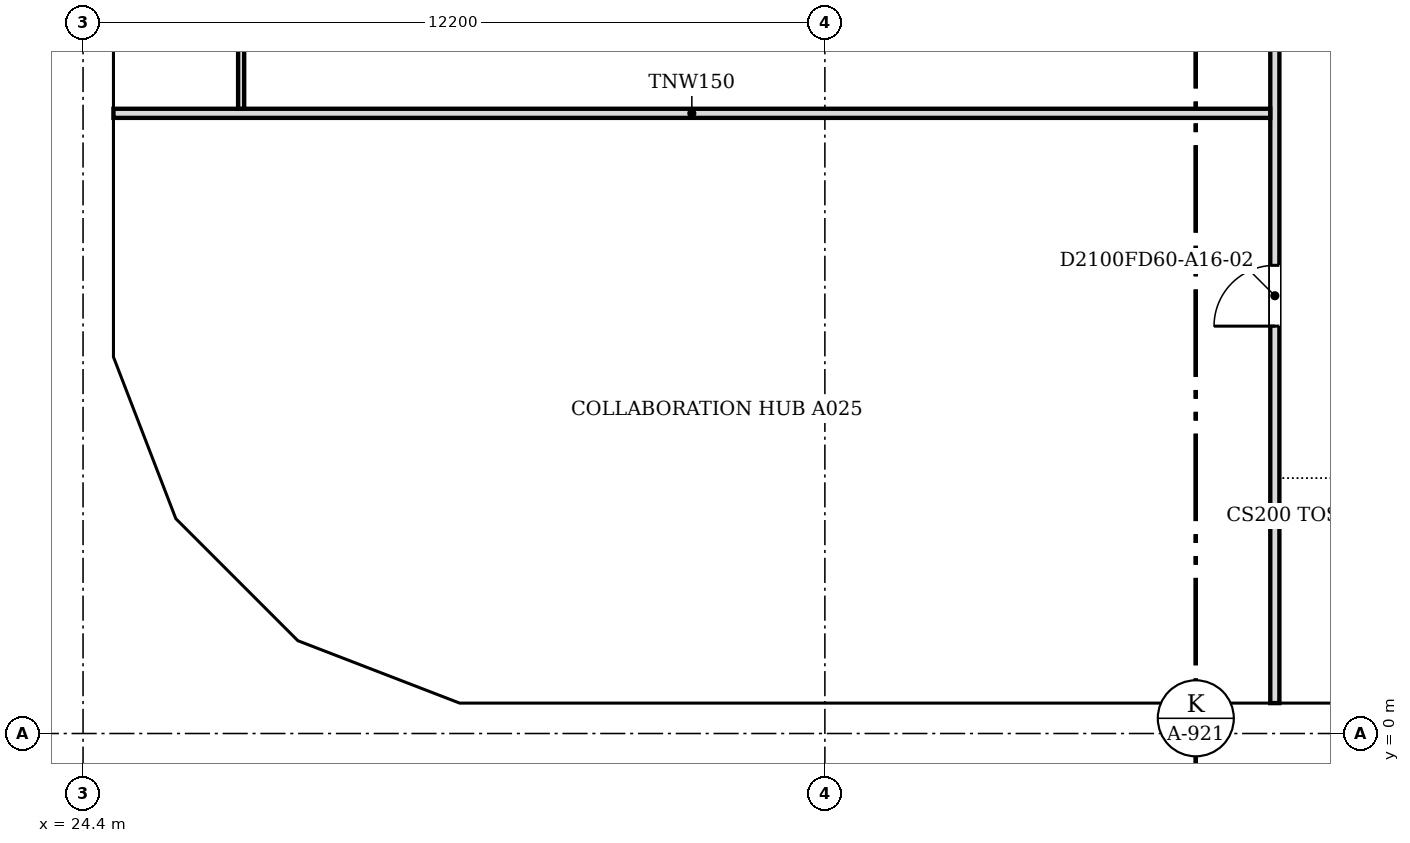
"""IFC4 building model, lengths in metres.
Left out: names, types, materials, properties, quantities, classifications, styles, units other than length and angle.
Written with IfcOpenShell. Run it as: python <this file> out.ifc"""

import sys

from ifc_helpers import new_model, si_unit, direction, frame, frame_2d, origin, place, context, subcontext, project, spatial, polyline, rectangle, outline, extrude, faceted_brep, source, transform, mapped, element, fill, save


model = new_model("IFC4")
c1 = context("Model", 3, precision=1e-05, world=origin(), true_north=direction((0.0, 1.0)))
c2 = subcontext(c1, "Body", "Model", "MODEL_VIEW")
j1 = project(units=[si_unit("LENGTHUNIT", "METRE"), si_unit("PLANEANGLEUNIT", "RADIAN")], contexts=[c1])
p1 = place(None, origin())
s1 = spatial("IfcSite", under=j1, at=p1, CompositionType="ELEMENT")
p2 = place(p1, origin())
s2 = spatial("IfcBuilding", under=s1, at=p2, CompositionType="ELEMENT")
p3 = place(p2, frame((0.0, 0.0, 178.2)))
s3 = spatial("IfcBuildingStorey", under=s2, at=p3, CompositionType="ELEMENT", Elevation=178.2)
m1 = source(origin(), c2, "Body", "Brep", [
    faceted_brep([(0.047, -0.25, 0.0), (3.05, -0.25, 3.8), (0.047, -0.25, 7.6), (0.0, -0.25, 7.54), (0.0, -0.25, 0.06), (0.093, 0.25, 7.541), (3.05, 0.25, 3.8), (0.093, 0.25, 0.059), (0.047, 0.0, 0.0), (0.047, 0.0, 7.6)], [[[0, 1, 2, 3, 4]], [[5, 6, 7]], [[7, 6, 1, 0, 8]], [[6, 5, 9, 2, 1]], [[3, 2, 9]], [[8, 0, 4]], [[7, 8, 4, 3, 9, 5]]]),
])
p4 = place(p3, frame((30.5, 0.25, -3.8), z_axis=(0.0, 0.0, 1.0), x_axis=(1.0, 0.0, 0.0)))
e1 = element("IfcWall", 1, at=p4, inside=s3, PredefinedType="SOLIDWALL", context=c2, shape_type="MappedRepresentation", body=[
    mapped(m1, transform((0.0, 0.0, 0.0), scale=1.0)),
])
m2 = source(origin(), c2, "Body", "SweptSolid", [
    extrude(outline(polyline([(0.247, 0.656), (2.731, 3.8), (0.247, 6.944), (0.247, 0.656)])), frame((0.0, 0.26, 0.0), z_axis=(0.0, -1.0, 0.0), x_axis=(1.0, 0.0, 0.0)), (0.0, 0.0, 1.0), 0.52),
])
p5 = place(p4, origin())
e2 = element("IfcOpeningElement", 2, at=p5, cuts=e1, PredefinedType="OPENING", context=c2, shape_type="MappedRepresentation", body=[
    mapped(m2, transform((0.0, 0.0, 0.0), scale=1.0)),
])
m3 = source(origin(), c2, "Body", "Brep", [
    faceted_brep([(2.95, -0.25, 0.0), (2.997, -0.25, 0.059), (2.997, -0.25, 7.541), (2.95, -0.25, 7.6), (0.0, -0.25, 3.8), (0.053, 0.25, 3.868), (2.904, 0.25, 7.54), (2.904, 0.25, 0.06), (0.053, 0.25, 3.732), (2.95, 0.0, 0.0), (2.95, 0.0, 7.6), (0.0, 0.0, 3.8)], [[[0, 1, 2, 3, 4]], [[5, 6, 7, 8]], [[1, 0, 9]], [[10, 3, 2]], [[6, 5, 11, 4, 3, 10]], [[8, 7, 9, 0, 4, 11]], [[8, 11, 5]], [[1, 9, 7, 6, 10, 2]]]),
])
p6 = place(p3, frame((27.794, 1.312, -3.8), z_axis=(0.0, 0.0, 1.0), x_axis=(0.932973525033, -0.359944998003, 0.0)))
e3 = element("IfcWall", 3, at=p6, inside=s3, PredefinedType="SOLIDWALL", context=c2, shape_type="MappedRepresentation", body=[
    mapped(m3, transform((0.0, 0.0, 0.0), scale=1.0)),
])
m4 = source(origin(), c2, "Body", "SweptSolid", [
    extrude(outline(polyline([(2.75, 6.935), (0.316, 3.8), (2.75, 0.665), (2.75, 6.935)])), frame((0.0, 0.26, 0.0), z_axis=(0.0, -1.0, 0.0), x_axis=(1.0, 0.0, 0.0)), (0.0, 0.0, 1.0), 0.52),
])
p7 = place(p6, origin())
e4 = element("IfcOpeningElement", 4, at=p7, cuts=e3, PredefinedType="OPENING", context=c2, shape_type="MappedRepresentation", body=[
    mapped(m4, transform((0.0, 0.0, 0.0), scale=1.0)),
])
m5 = source(origin(), c2, "Body", "Brep", [
    faceted_brep([(3.05, -0.25, 0.0), (6.1, -0.25, 3.8), (6.1, -0.25, 3.8), (3.05, -0.25, 7.6), (0.0, -0.25, 3.8), (0.0, 0.25, 3.8), (3.05, 0.25, 7.6), (6.1, 0.25, 3.8), (6.1, 0.25, 3.8), (3.05, 0.25, 0.0)], [[[0, 1, 2, 3, 4]], [[5, 6, 7, 8, 9]], [[9, 8, 1, 0]], [[7, 6, 3, 2]], [[6, 5, 4, 3]], [[5, 9, 0, 4]], [[1, 8, 7, 2]]]),
])
p8 = place(p3, frame((33.55, 0.25, -3.8), z_axis=(0.0, 0.0, 1.0), x_axis=(1.0, 0.0, 0.0)))
e5 = element("IfcWall", 5, at=p8, inside=s3, PredefinedType="SOLIDWALL", context=c2, shape_type="MappedRepresentation", body=[
    mapped(m5, transform((0.0, 0.0, 0.0), scale=1.0)),
])
m6 = source(origin(), c2, "Body", "SweptSolid", [
    extrude(outline(polyline([(3.05, 0.399), (5.78, 3.8), (3.05, 7.201), (0.321, 3.8), (3.05, 0.399)])), frame((0.0, 0.26, 0.0), z_axis=(0.0, -1.0, 0.0), x_axis=(1.0, 0.0, 0.0)), (0.0, 0.0, 1.0), 0.52),
])
p9 = place(p8, origin())
e6 = element("IfcOpeningElement", 6, at=p9, cuts=e5, PredefinedType="OPENING", context=c2, shape_type="MappedRepresentation", body=[
    mapped(m6, transform((0.0, 0.0, 0.0), scale=1.0)),
])
m7 = source(origin(), c2, "Body", "SweptSolid", [
    extrude(outline(polyline([(3.05, 0.0), (6.1, 3.8), (3.05, 7.6), (0.0, 3.8), (3.05, 0.0)])), frame((0.0, 0.25, 0.0), z_axis=(0.0, -1.0, 0.0), x_axis=(1.0, 0.0, 0.0)), (0.0, 0.0, 1.0), 0.5),
])
p10 = place(p3, frame((39.65, 0.25, -3.8), z_axis=(0.0, 0.0, 1.0), x_axis=(1.0, 0.0, 0.0)))
e7 = element("IfcWall", 7, at=p10, inside=s3, PredefinedType="SOLIDWALL", context=c2, shape_type="MappedRepresentation", body=[
    mapped(m7, transform((0.0, 0.0, 0.0), scale=1.0)),
])
p11 = place(p10, origin())
e8 = element("IfcOpeningElement", 8, at=p11, cuts=e7, PredefinedType="OPENING", context=c2, shape_type="MappedRepresentation", body=[
    mapped(m6, transform((0.0, 0.0, 0.0), scale=1.0)),
])
m8 = source(origin(), c2, "Body", "Brep", [
    faceted_brep([(3.096, -0.25, 0.0), (6.1, -0.25, 3.8), (3.096, -0.25, 7.6), (0.047, -0.25, 3.857), (0.047, -0.25, 3.743), (0.0, 0.25, 3.8), (3.096, 0.25, 7.6), (6.053, 0.25, 3.859), (6.053, 0.25, 3.741), (3.096, 0.25, 0.0), (6.1, -0.0, 3.8), (0.0, 0.0, 3.8)], [[[0, 1, 2, 3, 4]], [[5, 6, 7, 8, 9]], [[9, 8, 10, 1, 0]], [[7, 6, 2, 1, 10]], [[6, 5, 11, 3, 2]], [[5, 9, 0, 4, 11]], [[11, 4, 3]], [[10, 8, 7]]]),
])
p12 = place(p3, frame((24.65, 12.247, -3.8), z_axis=(0.0, 0.0, 1.0), x_axis=(0.0, -1.0, 0.0)))
e9 = element("IfcWall", 9, at=p12, inside=s3, PredefinedType="SOLIDWALL", context=c2, shape_type="MappedRepresentation", body=[
    mapped(m8, transform((0.0, 0.0, 0.0), scale=1.0)),
])
m9 = source(origin(), c2, "Body", "SweptSolid", [
    extrude(outline(polyline([(3.094, 0.399), (5.781, 3.8), (3.094, 7.201), (0.323, 3.8), (3.094, 0.399)])), frame((0.0, 0.26, 0.0), z_axis=(0.0, -1.0, 0.0), x_axis=(1.0, 0.0, 0.0)), (0.0, 0.0, 1.0), 0.52),
])
p13 = place(p12, origin())
e10 = element("IfcOpeningElement", 10, at=p13, cuts=e9, PredefinedType="OPENING", context=c2, shape_type="MappedRepresentation", body=[
    mapped(m9, transform((0.0, 0.0, 0.0), scale=1.0)),
])
m10 = source(origin(), c2, "Body", "Brep", [
    faceted_brep([(2.95, -0.25, 0.0), (3.003, -0.25, 0.068), (3.003, -0.25, 7.532), (2.95, -0.25, 7.6), (0.0, -0.25, 3.8), (0.047, 0.25, 3.86), (2.898, 0.25, 7.532), (2.898, 0.25, 0.068), (0.047, 0.25, 3.74), (2.95, 0.0, 0.0), (2.95, 0.0, 7.6), (0.0, 0.0, 3.8)], [[[0, 1, 2, 3, 4]], [[5, 6, 7, 8]], [[1, 0, 9]], [[10, 3, 2]], [[6, 5, 11, 4, 3, 10]], [[8, 7, 9, 0, 4, 11]], [[8, 11, 5]], [[1, 9, 7, 6, 10, 2]]]),
])
p14 = place(p3, frame((24.65, 6.146, -3.8), z_axis=(0.0, 0.0, 1.0), x_axis=(0.359953949349, -0.932970071518, 0.0)))
e11 = element("IfcWall", 11, at=p14, inside=s3, PredefinedType="SOLIDWALL", context=c2, shape_type="MappedRepresentation", body=[
    mapped(m10, transform((0.0, 0.0, 0.0), scale=1.0)),
])
p15 = place(p14, origin())
e12 = element("IfcOpeningElement", 12, at=p15, cuts=e11, PredefinedType="OPENING", context=c2, shape_type="MappedRepresentation", body=[
    mapped(m4, transform((0.0, 0.0, 0.0), scale=1.0)),
])
m11 = source(origin(), c2, "Body", "Brep", [
    faceted_brep([(0.053, -0.25, 0.0), (2.997, -0.25, 3.8), (0.053, -0.25, 7.6), (0.0, -0.25, 7.532), (0.0, -0.25, 0.068), (0.106, 0.25, 7.532), (2.944, 0.25, 3.868), (2.944, 0.25, 3.732), (0.106, 0.25, 0.068), (2.997, 0.0, 3.8), (0.053, 0.0, 0.0), (0.053, 0.0, 7.6)], [[[0, 1, 2, 3, 4]], [[5, 6, 7, 8]], [[8, 7, 9, 1, 0, 10]], [[6, 5, 11, 2, 1, 9]], [[3, 2, 11]], [[10, 0, 4]], [[8, 10, 4, 3, 11, 5]], [[9, 7, 6]]]),
])
p16 = place(p3, frame((25.675, 3.431, -3.8), z_axis=(0.0, 0.0, 1.0), x_axis=(0.707106781187, -0.707106781187, 0.0)))
e13 = element("IfcWall", 13, at=p16, inside=s3, PredefinedType="SOLIDWALL", context=c2, shape_type="MappedRepresentation", body=[
    mapped(m11, transform((0.0, 0.0, 0.0), scale=1.0)),
])
m12 = source(origin(), c2, "Body", "SweptSolid", [
    extrude(outline(polyline([(0.253, 0.667), (2.681, 3.8), (0.253, 6.934), (0.253, 0.667)])), frame((0.0, 0.26, 0.0), z_axis=(0.0, -1.0, 0.0), x_axis=(1.0, 0.0, 0.0)), (0.0, 0.0, 1.0), 0.52),
])
p17 = place(p16, origin())
e14 = element("IfcOpeningElement", 14, at=p17, cuts=e13, PredefinedType="OPENING", context=c2, shape_type="MappedRepresentation", body=[
    mapped(m12, transform((0.0, 0.0, 0.0), scale=1.0)),
])
p18 = place(p2, frame((0.0, 0.0, 182.0)))
s4 = spatial("IfcBuildingStorey", under=s2, at=p18, CompositionType="ELEMENT", Elevation=182.0)
m13 = source(origin(), c2, "Body", "Brep", [
    faceted_brep([(3.003, -0.25, 0.0), (6.053, -0.25, 3.8), (3.003, -0.25, 7.6), (0.0, -0.25, 3.8), (0.047, 0.25, 3.859), (3.003, 0.25, 7.6), (6.053, 0.25, 3.8), (3.003, 0.25, 0.0), (0.047, 0.25, 3.741), (0.0, 0.0, 3.8)], [[[0, 1, 2, 3]], [[4, 5, 6, 7, 8]], [[7, 6, 1, 0]], [[6, 5, 2, 1]], [[5, 4, 9, 3, 2]], [[8, 7, 0, 3, 9]], [[8, 9, 4]]]),
])
p19 = place(p18, frame((30.547, 0.25, -3.8), z_axis=(0.0, 0.0, 1.0), x_axis=(1.0, 0.0, 0.0)))
e15 = element("IfcWall", 15, at=p19, inside=s4, PredefinedType="SOLIDWALL", context=c2, shape_type="MappedRepresentation", body=[
    mapped(m13, transform((0.0, 0.0, 0.0), scale=1.0)),
])
m14 = source(origin(), c2, "Body", "SweptSolid", [
    extrude(outline(polyline([(3.005, 0.401), (5.733, 3.8), (3.005, 7.199), (0.319, 3.8), (3.005, 0.401)])), frame((0.0, 0.26, 0.0), z_axis=(0.0, -1.0, 0.0), x_axis=(1.0, 0.0, 0.0)), (0.0, 0.0, 1.0), 0.52),
])
p20 = place(p19, origin())
e16 = element("IfcOpeningElement", 16, at=p20, cuts=e15, PredefinedType="OPENING", context=c2, shape_type="MappedRepresentation", body=[
    mapped(m14, transform((0.0, 0.0, 0.0), scale=1.0)),
])
p21 = place(p18, frame((36.6, 0.25, -3.8), z_axis=(0.0, 0.0, 1.0), x_axis=(1.0, 0.0, 0.0)))
e17 = element("IfcWall", 17, at=p21, inside=s4, PredefinedType="SOLIDWALL", context=c2, shape_type="MappedRepresentation", body=[
    mapped(m5, transform((0.0, 0.0, 0.0), scale=1.0)),
])
p22 = place(p21, origin())
e18 = element("IfcOpeningElement", 18, at=p22, cuts=e17, PredefinedType="OPENING", context=c2, shape_type="MappedRepresentation", body=[
    mapped(m6, transform((0.0, 0.0, 0.0), scale=1.0)),
])
p23 = place(p18, frame((42.7, 0.25, -3.8), z_axis=(0.0, 0.0, 1.0), x_axis=(1.0, 0.0, 0.0)))
e19 = element("IfcWall", 19, at=p23, inside=s4, PredefinedType="SOLIDWALL", context=c2, shape_type="MappedRepresentation", body=[
    mapped(m7, transform((0.0, 0.0, 0.0), scale=1.0)),
])
p24 = place(p23, origin())
e20 = element("IfcOpeningElement", 20, at=p24, cuts=e19, PredefinedType="OPENING", context=c2, shape_type="MappedRepresentation", body=[
    mapped(m6, transform((0.0, 0.0, 0.0), scale=1.0)),
])
m15 = source(origin(), c2, "Body", "Brep", [
    faceted_brep([(0.093, -0.25, 0.057), (3.143, -0.25, 3.8), (0.093, -0.25, 7.543), (0.0, 0.25, 7.544), (0.047, 0.25, 7.6), (3.143, 0.25, 3.8), (0.047, 0.25, 0.0), (0.0, 0.25, 0.056), (0.047, 0.0, 0.0), (0.047, 0.0, 7.6)], [[[0, 1, 2]], [[3, 4, 5, 6, 7]], [[6, 5, 1, 0, 8]], [[5, 4, 9, 2, 1]], [[4, 3, 9]], [[7, 6, 8]], [[7, 8, 0, 2, 9, 3]]]),
])
p25 = place(p18, frame((24.65, 12.293, -3.8), z_axis=(0.0, 0.0, 1.0), x_axis=(0.0, -1.0, 0.0)))
e21 = element("IfcWall", 21, at=p25, inside=s4, PredefinedType="SOLIDWALL", context=c2, shape_type="MappedRepresentation", body=[
    mapped(m15, transform((0.0, 0.0, 0.0), scale=1.0)),
])
m16 = source(origin(), c2, "Body", "SweptSolid", [
    extrude(outline(polyline([(0.247, 0.641), (2.821, 3.8), (0.247, 6.959), (0.247, 0.641)])), frame((0.0, 0.26, 0.0), z_axis=(0.0, -1.0, 0.0), x_axis=(1.0, 0.0, 0.0)), (0.0, 0.0, 1.0), 0.52),
])
p26 = place(p25, origin())
e22 = element("IfcOpeningElement", 22, at=p26, cuts=e21, PredefinedType="OPENING", context=c2, shape_type="MappedRepresentation", body=[
    mapped(m16, transform((0.0, 0.0, 0.0), scale=1.0)),
])
m17 = source(origin(), c2, "Body", "Brep", [
    faceted_brep([(3.003, -0.25, 0.0), (3.05, -0.25, 0.06), (3.05, -0.25, 7.54), (3.003, -0.25, 7.6), (0.0, -0.25, 3.8), (0.0, 0.25, 3.8), (2.957, 0.25, 7.541), (2.957, 0.25, 0.059), (3.003, 0.0, 0.0), (3.003, 0.0, 7.6)], [[[0, 1, 2, 3, 4]], [[5, 6, 7]], [[1, 0, 8]], [[9, 3, 2]], [[6, 5, 4, 3, 9]], [[5, 7, 8, 0, 4]], [[1, 8, 7, 6, 9, 2]]]),
])
p27 = place(p18, frame((24.65, 9.15, -3.8), z_axis=(0.0, 0.0, 1.0), x_axis=(0.0, -1.0, 0.0)))
e23 = element("IfcWall", 23, at=p27, inside=s4, PredefinedType="SOLIDWALL", context=c2, shape_type="MappedRepresentation", body=[
    mapped(m17, transform((0.0, 0.0, 0.0), scale=1.0)),
])
m18 = source(origin(), c2, "Body", "SweptSolid", [
    extrude(outline(polyline([(2.803, 6.944), (0.319, 3.8), (2.803, 0.656), (2.803, 6.944)])), frame((0.0, 0.26, 0.0), z_axis=(0.0, -1.0, 0.0), x_axis=(1.0, 0.0, 0.0)), (0.0, 0.0, 1.0), 0.52),
])
p28 = place(p27, origin())
e24 = element("IfcOpeningElement", 24, at=p28, cuts=e23, PredefinedType="OPENING", context=c2, shape_type="MappedRepresentation", body=[
    mapped(m18, transform((0.0, 0.0, 0.0), scale=1.0)),
])
m19 = source(origin(), c2, "Body", "Brep", [
    faceted_brep([(0.047, -0.25, 0.0), (2.997, -0.25, 3.8), (0.047, -0.25, 7.6), (0.0, -0.25, 7.541), (0.0, -0.25, 0.059), (0.093, 0.25, 7.54), (2.944, 0.25, 3.868), (2.944, 0.25, 3.732), (0.093, 0.25, 0.06), (2.997, 0.0, 3.8), (0.047, 0.0, 0.0), (0.047, 0.0, 7.6)], [[[0, 1, 2, 3, 4]], [[5, 6, 7, 8]], [[8, 7, 9, 1, 0, 10]], [[6, 5, 11, 2, 1, 9]], [[3, 2, 11]], [[10, 0, 4]], [[8, 10, 4, 3, 11, 5]], [[9, 7, 6]]]),
])
p29 = place(p18, frame((24.633, 6.19, -3.8), z_axis=(0.0, 0.0, 1.0), x_axis=(0.359901446078, -0.932990326376, 0.0)))
e25 = element("IfcWall", 25, at=p29, inside=s4, PredefinedType="SOLIDWALL", context=c2, shape_type="MappedRepresentation", body=[
    mapped(m19, transform((0.0, 0.0, 0.0), scale=1.0)),
])
m20 = source(origin(), c2, "Body", "SweptSolid", [
    extrude(outline(polyline([(0.247, 0.665), (2.681, 3.8), (0.247, 6.935), (0.247, 0.665)])), frame((0.0, 0.26, 0.0), z_axis=(0.0, -1.0, 0.0), x_axis=(1.0, 0.0, 0.0)), (0.0, 0.0, 1.0), 0.52),
])
p30 = place(p29, origin())
e26 = element("IfcOpeningElement", 26, at=p30, cuts=e25, PredefinedType="OPENING", context=c2, shape_type="MappedRepresentation", body=[
    mapped(m20, transform((0.0, 0.0, 0.0), scale=1.0)),
])
m21 = source(origin(), c2, "Body", "Brep", [
    faceted_brep([(2.944, -0.25, 0.0), (2.997, -0.25, 0.068), (2.997, -0.25, 7.532), (2.944, -0.25, 7.6), (0.0, -0.25, 3.8), (0.053, 0.25, 3.868), (2.891, 0.25, 7.532), (2.891, 0.25, 0.068), (0.053, 0.25, 3.732), (2.944, 0.0, 0.0), (2.944, 0.0, 7.6), (0.0, 0.0, 3.8)], [[[0, 1, 2, 3, 4]], [[5, 6, 7, 8]], [[1, 0, 9]], [[10, 3, 2]], [[6, 5, 11, 4, 3, 10]], [[8, 7, 9, 0, 4, 11]], [[8, 11, 5]], [[1, 9, 7, 6, 10, 2]]]),
])
p31 = place(p18, frame((25.712, 3.394, -3.8), z_axis=(0.0, 0.0, 1.0), x_axis=(0.707066050402, -0.707147509625, 0.0)))
e27 = element("IfcWall", 27, at=p31, inside=s4, PredefinedType="SOLIDWALL", context=c2, shape_type="MappedRepresentation", body=[
    mapped(m21, transform((0.0, 0.0, 0.0), scale=1.0)),
])
m22 = source(origin(), c2, "Body", "SweptSolid", [
    extrude(outline(polyline([(2.744, 6.934), (0.316, 3.8), (2.744, 0.666), (2.744, 6.934)])), frame((0.0, 0.26, 0.0), z_axis=(0.0, -1.0, 0.0), x_axis=(1.0, 0.0, 0.0)), (0.0, 0.0, 1.0), 0.52),
])
p32 = place(p31, origin())
e28 = element("IfcOpeningElement", 28, at=p32, cuts=e27, PredefinedType="OPENING", context=c2, shape_type="MappedRepresentation", body=[
    mapped(m22, transform((0.0, 0.0, 0.0), scale=1.0)),
])
m23 = source(origin(), c2, "Body", "Brep", [
    faceted_brep([(0.053, -0.25, 0.0), (3.003, -0.25, 3.8), (0.053, -0.25, 7.6), (0.0, -0.25, 7.532), (0.0, -0.25, 0.068), (0.106, 0.25, 7.532), (2.957, 0.25, 3.86), (2.957, 0.25, 3.74), (0.106, 0.25, 0.068), (3.003, 0.0, 3.8), (0.053, 0.0, 0.0), (0.053, 0.0, 7.6)], [[[0, 1, 2, 3, 4]], [[5, 6, 7, 8]], [[8, 7, 9, 1, 0, 10]], [[6, 5, 11, 2, 1, 9]], [[3, 2, 11]], [[10, 0, 4]], [[8, 10, 4, 3, 11, 5]], [[9, 7, 6]]]),
])
p33 = place(p18, frame((27.744, 1.331, -3.8), z_axis=(0.0, 0.0, 1.0), x_axis=(0.932970071518, -0.359953949349, 0.0)))
e29 = element("IfcWall", 29, at=p33, inside=s4, PredefinedType="SOLIDWALL", context=c2, shape_type="MappedRepresentation", body=[
    mapped(m23, transform((0.0, 0.0, 0.0), scale=1.0)),
])
m24 = source(origin(), c2, "Body", "SweptSolid", [
    extrude(outline(polyline([(0.253, 0.665), (2.687, 3.8), (0.253, 6.935), (0.253, 0.665)])), frame((0.0, 0.26, 0.0), z_axis=(0.0, -1.0, 0.0), x_axis=(1.0, 0.0, 0.0)), (0.0, 0.0, 1.0), 0.52),
])
p34 = place(p33, origin())
e30 = element("IfcOpeningElement", 30, at=p34, cuts=e29, PredefinedType="OPENING", context=c2, shape_type="MappedRepresentation", body=[
    mapped(m24, transform((0.0, 0.0, 0.0), scale=1.0)),
])
p35 = place(p3, frame((44.0, 0.5, 0.0), z_axis=(0.0, 0.0, 1.0), x_axis=(0.0, 1.0, 0.0)))
e31 = element("IfcWall", 31, at=p35, inside=s3, PredefinedType="PARTITIONING", context=c2, shape_type="SweptSolid", body=[
    extrude(rectangle(XDim=21.424, YDim=0.15, at=frame_2d((10.712, 0.0))), origin(), (0.0, 0.0, 1.0), 3.067),
])
m25 = source(origin(), c2, "Body", "SweptSolid", [
    extrude(rectangle(XDim=1.0, YDim=2.1, at=frame_2d((0.5, 1.05))), frame((0.0, 0.085, 0.0), z_axis=(0.0, -1.0, 0.0), x_axis=(1.0, 0.0, 0.0)), (0.0, 0.0, 1.0), 0.17),
])
p36 = place(p35, frame((6.2, 0.0, 0.0)))
e32 = element("IfcOpeningElement", 32, at=p36, cuts=e31, PredefinedType="OPENING", context=c2, shape_type="MappedRepresentation", body=[
    mapped(m25, transform((0.0, 0.0, 0.0), scale=1.0)),
])
m26 = source(origin(), c2, "Body", "SweptSolid", [
    extrude(rectangle(XDim=0.9, YDim=2.1, at=frame_2d((0.45, 1.05))), frame((0.0, 0.085, 0.0), z_axis=(0.0, -1.0, 0.0), x_axis=(1.0, 0.0, 0.0)), (0.0, 0.0, 1.0), 0.17),
])
p37 = place(p35, frame((15.1, 0.0, 0.0)))
e33 = element("IfcOpeningElement", 33, at=p37, cuts=e31, PredefinedType="OPENING", context=c2, shape_type="MappedRepresentation", body=[
    mapped(m26, transform((0.0, 0.0, 0.0), scale=1.0)),
])
p38 = place(p3, frame((24.9, 10.2, 0.0), z_axis=(0.0, 0.0, 1.0), x_axis=(1.0, 0.0, 0.0)))
e34 = element("IfcWall", 34, at=p38, inside=s3, PredefinedType="PARTITIONING", context=c2, shape_type="SweptSolid", body=[
    extrude(rectangle(XDim=19.024, YDim=0.15, at=frame_2d((9.512, 0.0))), origin(), (0.0, 0.0, 1.0), 3.067),
])
p39 = place(p3, frame((27.0, 10.276, 0.0), z_axis=(0.0, 0.0, 1.0), x_axis=(0.0, 1.0, 0.0)))
e35 = element("IfcWall", 35, at=p39, inside=s3, PredefinedType="PARTITIONING", context=c2, shape_type="SweptSolid", body=[
    extrude(rectangle(XDim=8.448, YDim=0.1, at=frame_2d((4.224, 0.0))), origin(), (0.0, 0.0, 1.0), 3.067),
])
m27 = source(origin(), c2, "Body", "SweptSolid", [
    extrude(rectangle(XDim=0.9, YDim=2.1, at=frame_2d((0.45, 1.05))), frame((0.0, 0.06, 0.0), z_axis=(0.0, -1.0, 0.0), x_axis=(1.0, 0.0, 0.0)), (0.0, 0.0, 1.0), 0.12),
])
p40 = place(p39, frame((1.6, 0.0, 0.0)))
e36 = element("IfcOpeningElement", 36, at=p40, cuts=e35, PredefinedType="OPENING", context=c2, shape_type="MappedRepresentation", body=[
    mapped(m27, transform((0.0, 0.0, 0.0), scale=1.0)),
])
p41 = place(p39, frame((5.779, 0.0, 0.0)))
e37 = element("IfcOpeningElement", 37, at=p41, cuts=e35, PredefinedType="OPENING", context=c2, shape_type="MappedRepresentation", body=[
    mapped(m27, transform((0.0, 0.0, 0.0), scale=1.0)),
])
m28 = source(origin(), c2, "Body", "SweptSolid", [
    extrude(rectangle(XDim=1.0, YDim=2.1, at=frame_2d((0.5, 1.05))), frame((0.0, 0.025, 0.0), z_axis=(0.0, -1.0, 0.0), x_axis=(1.0, 0.0, 0.0)), (0.0, 0.0, 1.0), 0.05),
])
p42 = place(p36, origin())
e38 = element("IfcDoor", 38, at=p42, inside=s3, OperationType="SINGLE_SWING_LEFT", PredefinedType="DOOR", context=c2, shape_type="MappedRepresentation", body=[
    mapped(m28, transform((0.0, 0.0, 0.0), scale=1.0)),
])
fill(e32, e38)
save(model, sys.argv[1])
